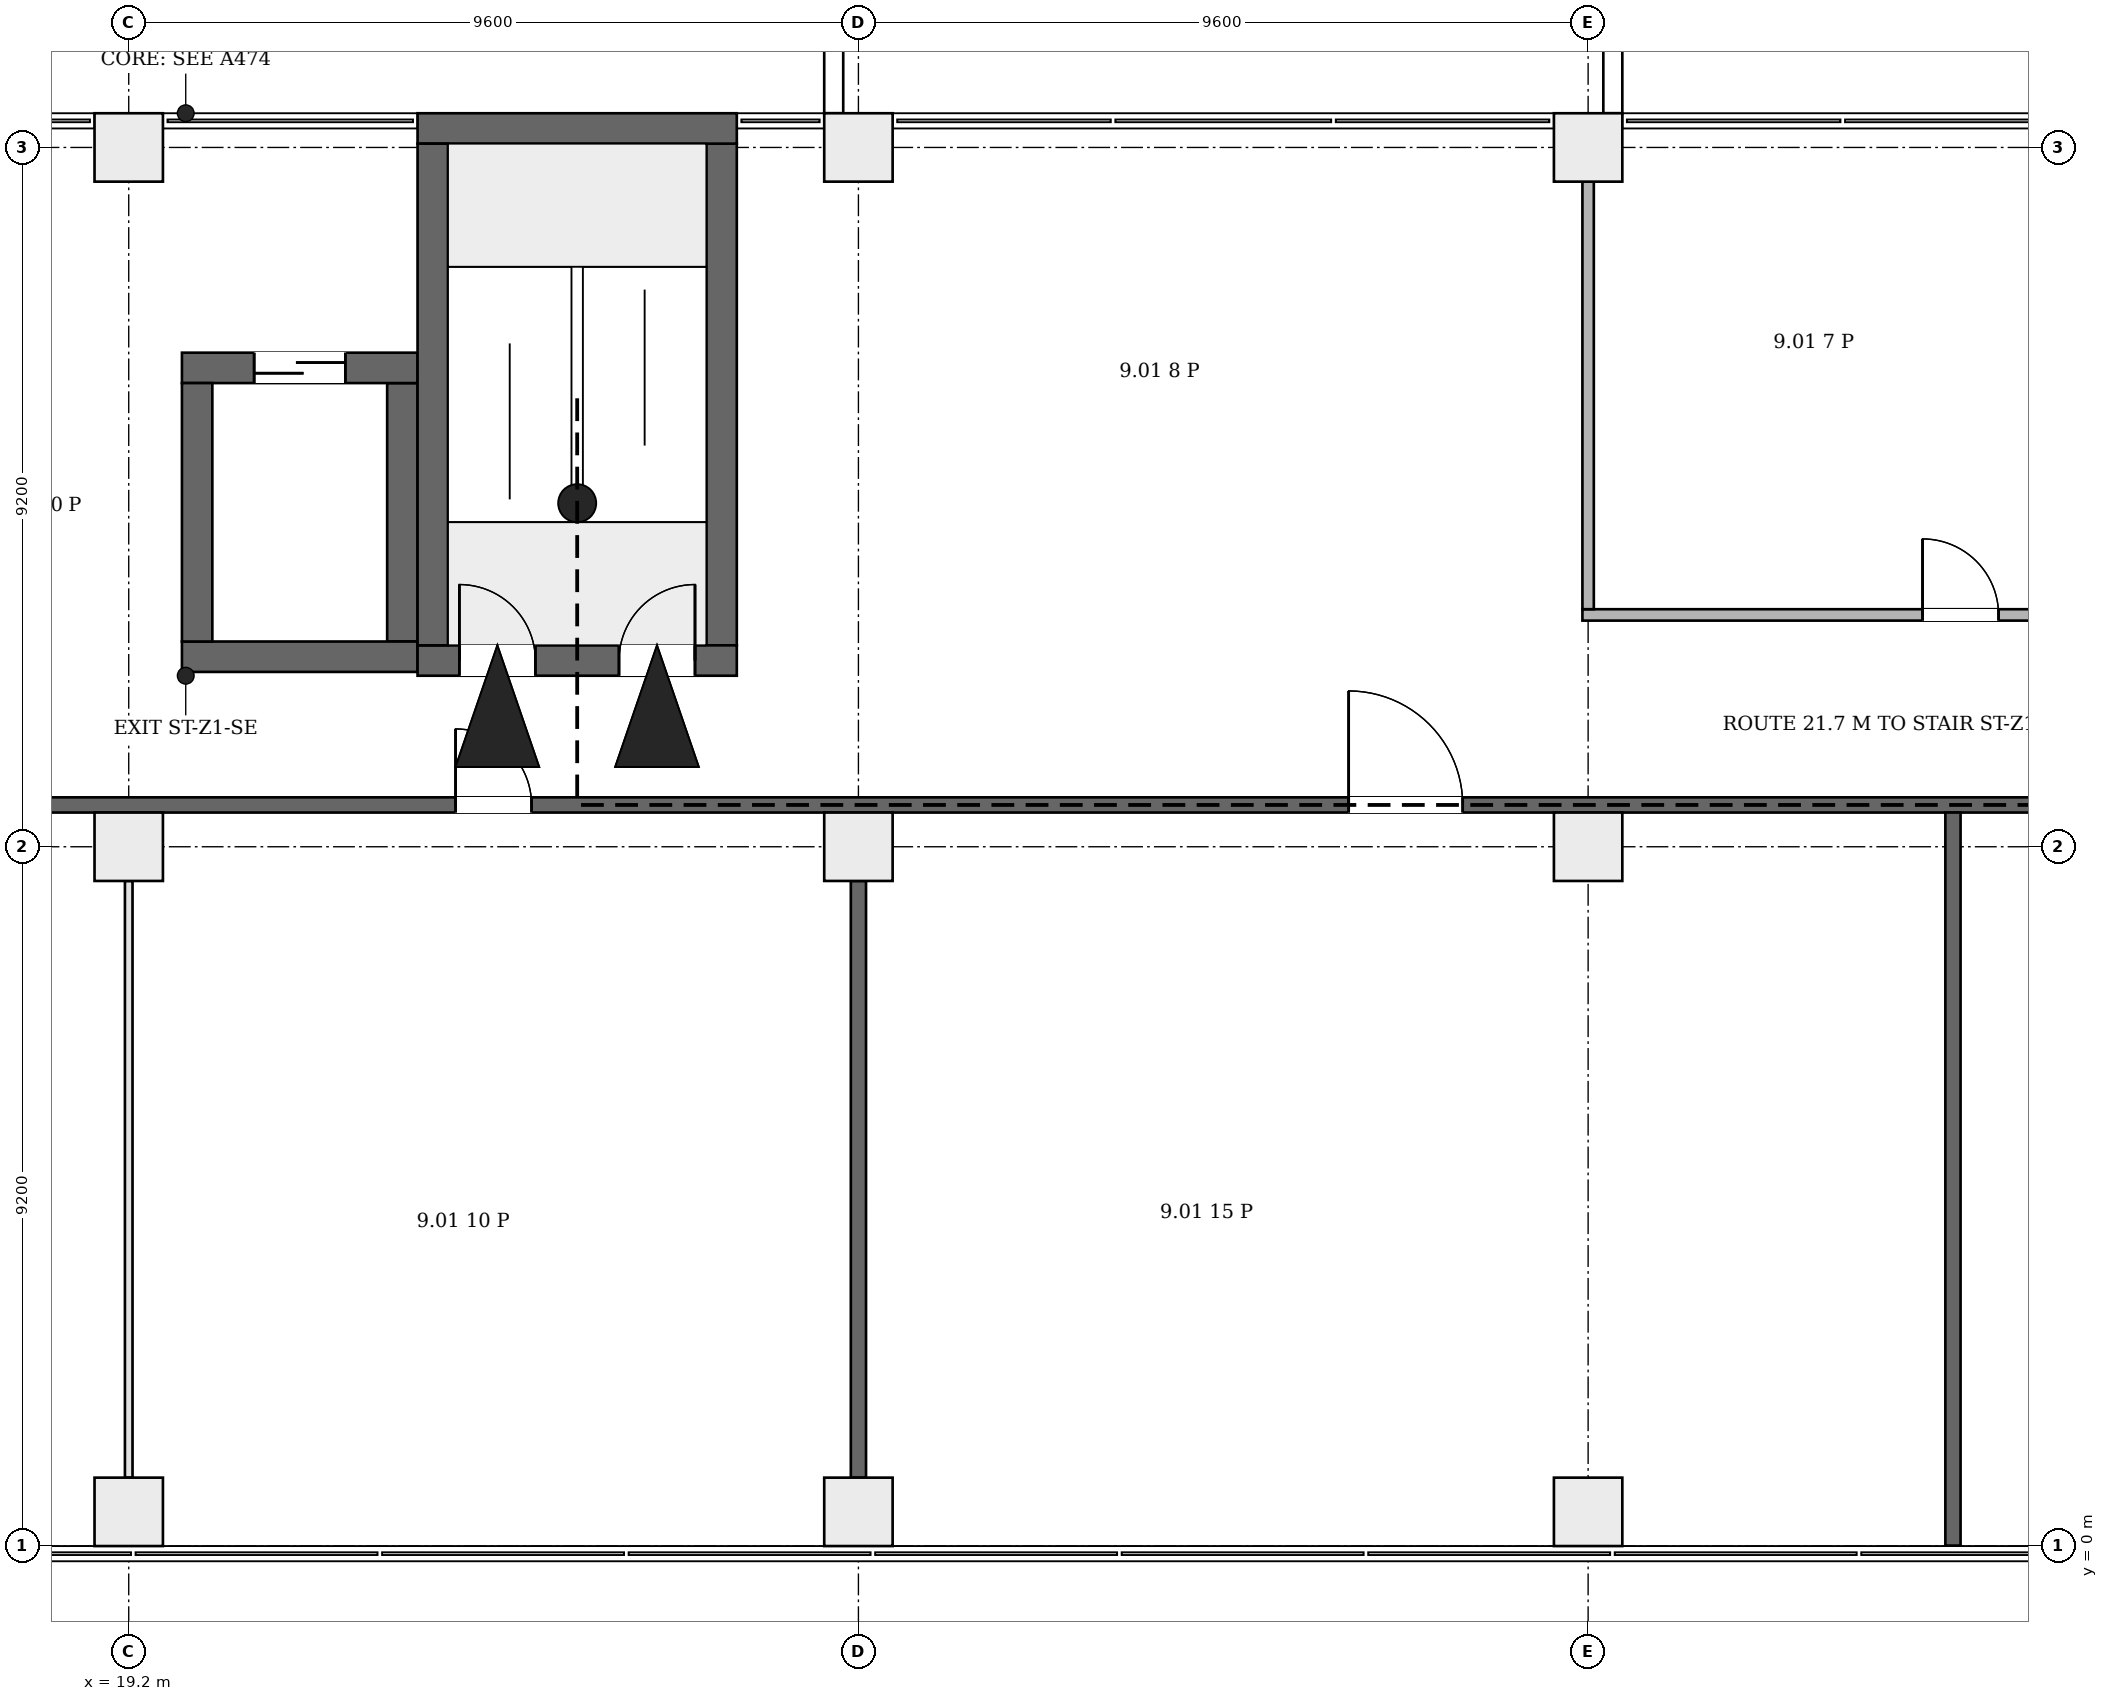
"""IFC4 building model, lengths in metres.
Left out: names, types, materials, properties, quantities, classifications, styles, units other than length and angle.
Written with IfcOpenShell. Run it as: python <this file> out.ifc"""

import sys

from ifc_helpers import new_model, si_unit, direction, frame, frame_2d, origin, origin_2d, place, context, subcontext, project, spatial, rectangle, extrude, element, fill, save


model = new_model("IFC4")
c1 = context("Model", 3, precision=1e-05, world=origin(), true_north=direction((0.0, 1.0)))
c2 = subcontext(c1, "Body", "Model", "MODEL_VIEW")
j1 = project(units=[si_unit("LENGTHUNIT", "METRE"), si_unit("PLANEANGLEUNIT", "RADIAN")], contexts=[c1])
p1 = place(None, origin())
s1 = spatial("IfcSite", under=j1, at=p1, CompositionType="ELEMENT")
p2 = place(p1, origin())
s2 = spatial("IfcBuilding", under=s1, at=p2, CompositionType="ELEMENT")
p3 = place(p2, frame((0.0, 0.0, 48.7)))
s3 = spatial("IfcBuildingStorey", under=s2, at=p3, CompositionType="ELEMENT", Elevation=48.7)
p4 = place(p3, frame((23.0, 11.65, 0.0), z_axis=(0.0, 0.0, 1.0), x_axis=(1.0, 0.0, 0.0)))
e1 = element("IfcWall", 1, at=p4, inside=s3, PredefinedType="SHEAR", context=c2, shape_type="SweptSolid", body=[
    extrude(rectangle(XDim=4.2, YDim=0.4, at=frame_2d((2.1, 0.0))), origin(), (0.0, 0.0, 1.0), 4.2),
])
p5 = place(p4, frame((0.55, 0.0, 0.0)))
e2 = element("IfcOpeningElement", 2, at=p5, cuts=e1, PredefinedType="OPENING", context=c2, shape_type="SweptSolid", body=[
    extrude(rectangle(XDim=1.0, YDim=2.1, at=frame_2d((0.5, 1.05))), frame((0.0, 0.21, 0.0), z_axis=(0.0, -1.0, 0.0), x_axis=(1.0, 0.0, 0.0)), (0.0, 0.0, 1.0), 0.42),
])
p6 = place(p4, frame((2.65, 0.0, 0.0)))
e3 = element("IfcOpeningElement", 3, at=p6, cuts=e1, PredefinedType="OPENING", context=c2, shape_type="SweptSolid", body=[
    extrude(rectangle(XDim=1.0, YDim=2.1, at=frame_2d((0.5, 1.05))), frame((0.0, 0.21, 0.0), z_axis=(0.0, -1.0, 0.0), x_axis=(1.0, 0.0, 0.0)), (0.0, 0.0, 1.0), 0.42),
])
p7 = place(p3, frame((23.0, 18.65, 0.0), z_axis=(0.0, 0.0, 1.0), x_axis=(1.0, 0.0, 0.0)))
e4 = element("IfcWall", 4, at=p7, inside=s3, PredefinedType="SHEAR", context=c2, shape_type="SweptSolid", body=[
    extrude(rectangle(XDim=4.2, YDim=0.4, at=frame_2d((2.1, 0.0))), origin(), (0.0, 0.0, 1.0), 4.2),
])
for number, where, z_axis, x_axis in (
    (5, (23.2, 11.85, 0.0), (0.0, 0.0, 1.0), (0.0, 1.0, 0.0)),
    (6, (27.0, 11.85, 0.0), (0.0, 0.0, 1.0), (0.0, 1.0, 0.0)),
):
    element("IfcWall", number, at=place(p3, frame(where, z_axis=z_axis, x_axis=x_axis)), inside=s3, PredefinedType="SHEAR", context=c2, shape_type="SweptSolid", body=[
        extrude(rectangle(XDim=6.6, YDim=0.4, at=frame_2d((3.3, 0.0))), origin(), (0.0, 0.0, 1.0), 4.2),
    ])
p8 = place(p3, frame((19.9, 11.7, 0.0), z_axis=(0.0, 0.0, 1.0), x_axis=(1.0, 0.0, 0.0)))
e7 = element("IfcWall", 7, at=p8, inside=s3, PredefinedType="SHEAR", context=c2, shape_type="SweptSolid", body=[
    extrude(rectangle(XDim=3.1, YDim=0.4, at=frame_2d((1.55, 0.0))), origin(), (0.0, 0.0, 1.0), 4.2),
])
p9 = place(p3, frame((19.9, 15.5, 0.0), z_axis=(0.0, 0.0, 1.0), x_axis=(1.0, 0.0, 0.0)))
e8 = element("IfcWall", 8, at=p9, inside=s3, PredefinedType="SHEAR", context=c2, shape_type="SweptSolid", body=[
    extrude(rectangle(XDim=3.1, YDim=0.4, at=frame_2d((1.55, 0.0))), origin(), (0.0, 0.0, 1.0), 4.2),
])
p10 = place(p9, frame((0.95, 0.0, 0.0)))
e9 = element("IfcOpeningElement", 9, at=p10, cuts=e8, PredefinedType="OPENING", context=c2, shape_type="SweptSolid", body=[
    extrude(rectangle(XDim=1.2, YDim=2.1, at=frame_2d((0.6, 1.05))), frame((0.0, 0.21, 0.0), z_axis=(0.0, -1.0, 0.0), x_axis=(1.0, 0.0, 0.0)), (0.0, 0.0, 1.0), 0.42),
])
for number, where, z_axis, x_axis in (
    (10, (20.1, 11.9, 0.0), (0.0, 0.0, 1.0), (0.0, 1.0, 0.0)),
    (11, (22.8, 11.9, 0.0), (0.0, 0.0, 1.0), (0.0, 1.0, 0.0)),
):
    element("IfcWall", number, at=place(p3, frame(where, z_axis=z_axis, x_axis=x_axis)), inside=s3, PredefinedType="SHEAR", context=c2, shape_type="SweptSolid", body=[
        extrude(rectangle(XDim=3.4, YDim=0.4, at=frame_2d((1.7, 0.0))), origin(), (0.0, 0.0, 1.0), 4.2),
    ])
for number, where, z_axis, x_axis in (
    (12, (19.2, 0.45, 0.0), (0.0, 0.0, 1.0), (1.0, 0.0, 0.0)),
    (13, (28.8, 0.45, 0.0), (0.0, 0.0, 1.0), (1.0, 0.0, 0.0)),
    (14, (38.4, 0.45, 0.0), (0.0, 0.0, 1.0), (1.0, 0.0, 0.0)),
    (15, (19.2, 9.2, 0.0), (0.0, 0.0, 1.0), (1.0, 0.0, 0.0)),
    (16, (28.8, 9.2, 0.0), (0.0, 0.0, 1.0), (1.0, 0.0, 0.0)),
    (17, (38.4, 9.2, 0.0), (0.0, 0.0, 1.0), (1.0, 0.0, 0.0)),
    (18, (19.2, 18.4, 0.0), (0.0, 0.0, 1.0), (1.0, 0.0, 0.0)),
    (19, (28.8, 18.4, 0.0), (0.0, 0.0, 1.0), (1.0, 0.0, 0.0)),
    (20, (38.4, 18.4, 0.0), (0.0, 0.0, 1.0), (1.0, 0.0, 0.0)),
):
    element("IfcColumn", number, at=place(p3, frame(where, z_axis=z_axis, x_axis=x_axis)), inside=s3, PredefinedType="COLUMN", context=c2, shape_type="SweptSolid", body=[
        extrude(rectangle(XDim=0.9, YDim=0.9, at=origin_2d()), origin(), (0.0, 0.0, 1.0), 4.2),
    ])
for number, where, z_axis, x_axis in (
    (21, (38.725, 18.85, 4.2), (0.0, 0.0, 1.0), (0.0, 1.0, 0.0)),
    (22, (28.475, 27.15, 4.2), (0.0, 0.0, 1.0), (0.0, -1.0, 0.0)),
):
    element("IfcWall", number, at=place(p3, frame(where, z_axis=z_axis, x_axis=x_axis)), inside=s3, PredefinedType="PARAPET", context=c2, shape_type="SweptSolid", body=[
        extrude(rectangle(XDim=8.3, YDim=0.25, at=frame_2d((4.15, 0.0))), origin(), (0.0, 0.0, 1.0), 1.1),
    ])
p11 = place(p3, frame((4.3, 9.75, 0.0), z_axis=(0.0, 0.0, 1.0), x_axis=(1.0, 0.0, 0.0)))
e23 = element("IfcWall", 23, at=p11, inside=s3, PredefinedType="PARTITIONING", context=c2, shape_type="SweptSolid", body=[
    extrude(rectangle(XDim=43.894, YDim=0.2, at=frame_2d((21.947, 0.0))), origin(), (0.0, 0.0, 1.0), 3.9),
])
p12 = place(p11, frame((7.0, 0.0, 0.0)))
e24 = element("IfcOpeningElement", 24, at=p12, cuts=e23, PredefinedType="OPENING", context=c2, shape_type="SweptSolid", body=[
    extrude(rectangle(XDim=1.0, YDim=2.1, at=frame_2d((0.5, 1.05))), frame((0.0, 0.11, 0.0), z_axis=(0.0, -1.0, 0.0), x_axis=(1.0, 0.0, 0.0)), (0.0, 0.0, 1.0), 0.22),
])
p13 = place(p11, frame((19.2, 0.0, 0.0)))
e25 = element("IfcOpeningElement", 25, at=p13, cuts=e23, PredefinedType="OPENING", context=c2, shape_type="SweptSolid", body=[
    extrude(rectangle(XDim=1.0, YDim=2.1, at=frame_2d((0.5, 1.05))), frame((0.0, 0.11, 0.0), z_axis=(0.0, -1.0, 0.0), x_axis=(1.0, 0.0, 0.0)), (0.0, 0.0, 1.0), 0.22),
])
p14 = place(p11, frame((30.95, 0.0, 0.0)))
e26 = element("IfcOpeningElement", 26, at=p14, cuts=e23, PredefinedType="OPENING", context=c2, shape_type="SweptSolid", body=[
    extrude(rectangle(XDim=1.5, YDim=2.1, at=frame_2d((0.75, 1.05))), frame((0.0, 0.11, 0.0), z_axis=(0.0, -1.0, 0.0), x_axis=(1.0, 0.0, 0.0)), (0.0, 0.0, 1.0), 0.22),
])
p15 = place(p11, frame((40.9, 0.0, 0.0)))
e27 = element("IfcOpeningElement", 27, at=p15, cuts=e23, PredefinedType="OPENING", context=c2, shape_type="SweptSolid", body=[
    extrude(rectangle(XDim=1.0, YDim=2.1, at=frame_2d((0.5, 1.05))), frame((0.0, 0.11, 0.0), z_axis=(0.0, -1.0, 0.0), x_axis=(1.0, 0.0, 0.0)), (0.0, 0.0, 1.0), 0.22),
])
p16 = place(p3, frame((19.2, 0.9, 0.0), z_axis=(0.0, 0.0, 1.0), x_axis=(0.0, 1.0, 0.0)))
e28 = element("IfcWall", 28, at=p16, inside=s3, PredefinedType="PARTITIONING", context=c2, shape_type="SweptSolid", body=[
    extrude(rectangle(XDim=7.85, YDim=0.1, at=frame_2d((3.925, 0.0))), origin(), (0.0, 0.0, 1.0), 3.9),
])
p17 = place(p3, frame((28.8, 0.9, 0.0), z_axis=(0.0, 0.0, 1.0), x_axis=(0.0, 1.0, 0.0)))
e29 = element("IfcWall", 29, at=p17, inside=s3, PredefinedType="PARTITIONING", context=c2, shape_type="SweptSolid", body=[
    extrude(rectangle(XDim=7.85, YDim=0.2, at=frame_2d((3.925, 0.0))), origin(), (0.0, 0.0, 1.0), 3.9),
])
p18 = place(p3, frame((38.325, 12.25, 0.0), z_axis=(0.0, 0.0, 1.0), x_axis=(1.0, 0.0, 0.0)))
e30 = element("IfcWall", 30, at=p18, inside=s3, PredefinedType="PARTITIONING", context=c2, shape_type="SweptSolid", body=[
    extrude(rectangle(XDim=9.869, YDim=0.15, at=frame_2d((4.935, 0.0))), origin(), (0.0, 0.0, 1.0), 3.9),
])
p19 = place(p18, frame((4.475, 0.0, 0.0)))
e31 = element("IfcOpeningElement", 31, at=p19, cuts=e30, PredefinedType="OPENING", context=c2, shape_type="SweptSolid", body=[
    extrude(rectangle(XDim=1.0, YDim=2.1, at=frame_2d((0.5, 1.05))), frame((0.0, 0.085, 0.0), z_axis=(0.0, -1.0, 0.0), x_axis=(1.0, 0.0, 0.0)), (0.0, 0.0, 1.0), 0.17),
])
p20 = place(p3, frame((38.4, 12.325, 0.0), z_axis=(0.0, 0.0, 1.0), x_axis=(0.0, 1.0, 0.0)))
e32 = element("IfcWall", 32, at=p20, inside=s3, PredefinedType="PARTITIONING", context=c2, shape_type="SweptSolid", body=[
    extrude(rectangle(XDim=5.625, YDim=0.15, at=frame_2d((2.812, 0.0))), origin(), (0.0, 0.0, 1.0), 3.9),
])
p21 = place(p3, frame((43.2, 0.006, 0.0), z_axis=(0.0, 0.0, 1.0), x_axis=(0.0, 1.0, 0.0)))
e33 = element("IfcWall", 33, at=p21, inside=s3, PredefinedType="PARTITIONING", context=c2, shape_type="SweptSolid", body=[
    extrude(rectangle(XDim=9.644, YDim=0.2, at=frame_2d((4.822, 0.0))), origin(), (0.0, 0.0, 1.0), 3.9),
])
p22 = place(p5, origin())
e34 = element("IfcDoor", 34, at=p22, inside=s3, OperationType="SINGLE_SWING_RIGHT", PredefinedType="DOOR", context=c2, shape_type="SweptSolid", body=[
    extrude(rectangle(XDim=1.0, YDim=2.1, at=frame_2d((0.5, 1.05))), frame((0.0, 0.025, 0.0), z_axis=(0.0, -1.0, 0.0), x_axis=(1.0, 0.0, 0.0)), (0.0, 0.0, 1.0), 0.05),
])
fill(e2, e34)
p23 = place(p6, origin())
e35 = element("IfcDoor", 35, at=p23, inside=s3, OperationType="SINGLE_SWING_LEFT", PredefinedType="DOOR", context=c2, shape_type="SweptSolid", body=[
    extrude(rectangle(XDim=1.0, YDim=2.1, at=frame_2d((0.5, 1.05))), frame((0.0, 0.025, 0.0), z_axis=(0.0, -1.0, 0.0), x_axis=(1.0, 0.0, 0.0)), (0.0, 0.0, 1.0), 0.05),
])
fill(e3, e35)
p24 = place(p10, origin())
e36 = element("IfcDoor", 36, at=p24, inside=s3, OperationType="DOUBLE_DOOR_SLIDING", PredefinedType="DOOR", context=c2, shape_type="SweptSolid", body=[
    extrude(rectangle(XDim=1.2, YDim=2.1, at=frame_2d((0.6, 1.05))), frame((0.0, 0.025, 0.0), z_axis=(0.0, -1.0, 0.0), x_axis=(1.0, 0.0, 0.0)), (0.0, 0.0, 1.0), 0.05),
])
fill(e9, e36)
p25 = place(p13, origin())
e37 = element("IfcDoor", 37, at=p25, inside=s3, OperationType="SINGLE_SWING_RIGHT", PredefinedType="DOOR", context=c2, shape_type="SweptSolid", body=[
    extrude(rectangle(XDim=1.0, YDim=2.1, at=frame_2d((0.5, 1.05))), frame((0.0, 0.025, 0.0), z_axis=(0.0, -1.0, 0.0), x_axis=(1.0, 0.0, 0.0)), (0.0, 0.0, 1.0), 0.05),
])
fill(e25, e37)
p26 = place(p14, origin())
e38 = element("IfcDoor", 38, at=p26, inside=s3, OperationType="DOUBLE_DOOR_SINGLE_SWING", PredefinedType="DOOR", context=c2, shape_type="SweptSolid", body=[
    extrude(rectangle(XDim=1.5, YDim=2.1, at=frame_2d((0.75, 1.05))), frame((0.0, 0.025, 0.0), z_axis=(0.0, -1.0, 0.0), x_axis=(1.0, 0.0, 0.0)), (0.0, 0.0, 1.0), 0.05),
])
fill(e26, e38)
p27 = place(p19, origin())
e39 = element("IfcDoor", 39, at=p27, inside=s3, OperationType="SINGLE_SWING_RIGHT", PredefinedType="DOOR", context=c2, shape_type="SweptSolid", body=[
    extrude(rectangle(XDim=1.0, YDim=2.1, at=frame_2d((0.5, 1.05))), frame((0.0, 0.025, 0.0), z_axis=(0.0, -1.0, 0.0), x_axis=(1.0, 0.0, 0.0)), (0.0, 0.0, 1.0), 0.05),
])
fill(e31, e39)
save(model, sys.argv[1])
